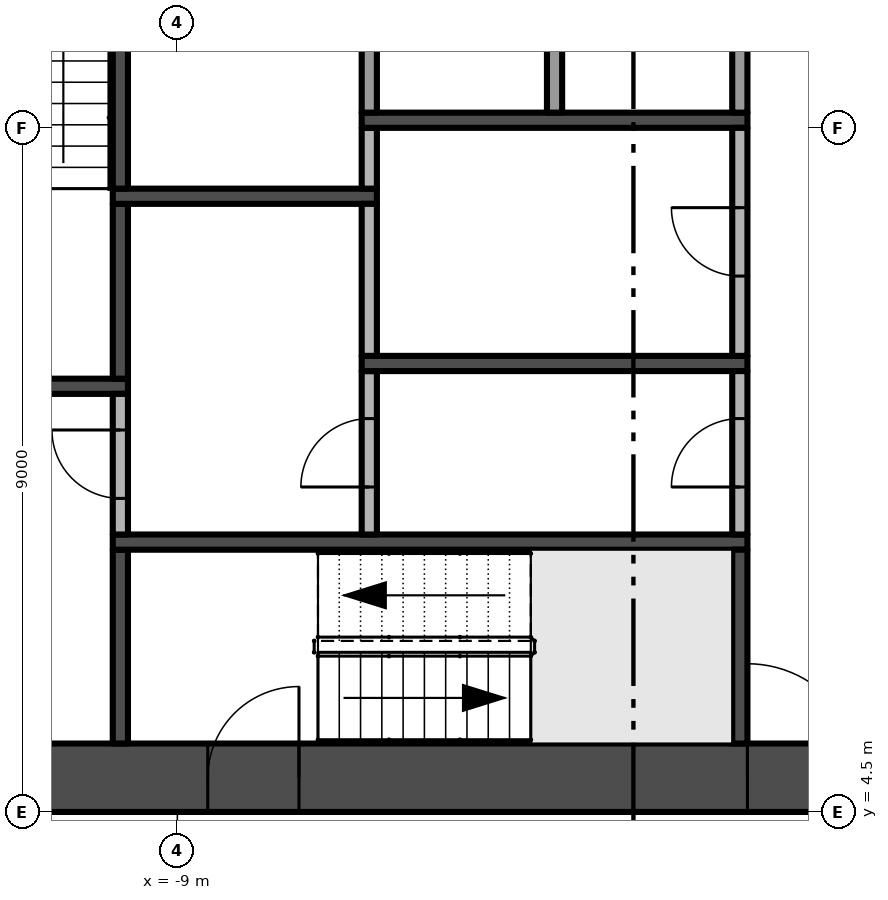
"""IFC4 building model, lengths in metres.
Left out: names, types, materials, properties, quantities, classifications, styles, units other than length and angle.
Written with IfcOpenShell. Run it as: python <this file> out.ifc"""

import sys

from ifc_helpers import new_model, si_unit, direction, frame, frame_2d, origin, place, context, subcontext, project, spatial, rectangle, extrude, element, fill, save


model = new_model("IFC4")
c1 = context("Model", 3, precision=1e-05, world=origin(), true_north=direction((0.0, 1.0)))
c2 = subcontext(c1, "Body", "Model", "MODEL_VIEW")
j1 = project(units=[si_unit("LENGTHUNIT", "METRE"), si_unit("PLANEANGLEUNIT", "RADIAN")], contexts=[c1])
p1 = place(None, origin())
s1 = spatial("IfcSite", under=j1, at=p1, CompositionType="ELEMENT")
p2 = place(p1, origin())
s2 = spatial("IfcBuilding", under=s1, at=p2, CompositionType="ELEMENT")
p3 = place(p2, frame((0.0, 0.0, 22.6)))
s3 = spatial("IfcBuildingStorey", under=s2, at=p3, CompositionType="ELEMENT", Elevation=22.6)
p4 = place(p3, frame((-13.5, 4.95, -0.3), z_axis=(0.0, 0.0, 1.0), x_axis=(1.0, 0.0, 0.0)))
e1 = element("IfcWall", 1, at=p4, inside=s3, PredefinedType="SHEAR", context=c2, shape_type="SweptSolid", body=[
    extrude(rectangle(XDim=27.0, YDim=0.9, at=frame_2d((13.5, 0.0))), origin(), (0.0, 0.0, 1.0), 3.8),
])
p5 = place(p4, frame((12.0, 0.0, 0.3)))
e2 = element("IfcOpeningElement", 2, at=p5, cuts=e1, PredefinedType="OPENING", context=c2, shape_type="SweptSolid", body=[
    extrude(rectangle(XDim=3.0, YDim=2.4, at=frame_2d((1.5, 1.2))), frame((0.0, 0.46, 0.0), z_axis=(0.0, -1.0, 0.0), x_axis=(1.0, 0.0, 0.0)), (0.0, 0.0, 1.0), 0.92),
])
p6 = place(p4, frame((4.9, 0.0, 0.3)))
e3 = element("IfcOpeningElement", 3, at=p6, cuts=e1, PredefinedType="OPENING", context=c2, shape_type="SweptSolid", body=[
    extrude(rectangle(XDim=1.2, YDim=2.2, at=frame_2d((0.6, 1.1))), frame((0.0, 0.46, 0.0), z_axis=(0.0, -1.0, 0.0), x_axis=(1.0, 0.0, 0.0)), (0.0, 0.0, 1.0), 0.92),
])
p7 = place(p4, frame((20.75, 0.0, 0.3)))
e4 = element("IfcOpeningElement", 4, at=p7, cuts=e1, PredefinedType="OPENING", context=c2, shape_type="SweptSolid", body=[
    extrude(rectangle(XDim=1.5, YDim=2.2, at=frame_2d((0.75, 1.1))), frame((0.0, 0.46, 0.0), z_axis=(0.0, -1.0, 0.0), x_axis=(1.0, 0.0, 0.0)), (0.0, 0.0, 1.0), 0.92),
])
p8 = place(p4, frame((17.4, 0.0, 0.3)))
e5 = element("IfcOpeningElement", 5, at=p8, cuts=e1, PredefinedType="OPENING", context=c2, shape_type="SweptSolid", body=[
    extrude(rectangle(XDim=1.2, YDim=2.2, at=frame_2d((0.6, 1.1))), frame((0.0, 0.46, 0.0), z_axis=(0.0, -1.0, 0.0), x_axis=(1.0, 0.0, 0.0)), (0.0, 0.0, 1.0), 0.92),
])
p9 = place(p3, frame((-12.6, 10.1, 0.0), z_axis=(0.0, 0.0, 1.0), x_axis=(1.0, 0.0, 0.0)))
e6 = element("IfcWall", 6, at=p9, inside=s3, PredefinedType="SHEAR", context=c2, shape_type="SweptSolid", body=[
    extrude(rectangle(XDim=2.95, YDim=0.2, at=frame_2d((1.475, 0.0))), origin(), (0.0, 0.0, 1.0), 3.5),
])
p10 = place(p3, frame((-9.75, 5.4, 0.0), z_axis=(0.0, 0.0, 1.0), x_axis=(0.0, 1.0, 0.0)))
e7 = element("IfcWall", 7, at=p10, inside=s3, PredefinedType="SHEAR", context=c2, shape_type="SweptSolid", body=[
    extrude(rectangle(XDim=2.55, YDim=0.2, at=frame_2d((1.275, 0.0))), origin(), (0.0, 0.0, 1.0), 3.5),
])
p11 = place(p3, frame((-9.85, 8.05, 0.0), z_axis=(0.0, 0.0, 1.0), x_axis=(1.0, 0.0, 0.0)))
e8 = element("IfcWall", 8, at=p11, inside=s3, PredefinedType="SHEAR", context=c2, shape_type="SweptSolid", body=[
    extrude(rectangle(XDim=8.35, YDim=0.2, at=frame_2d((4.175, 0.0))), origin(), (0.0, 0.0, 1.0), 3.5),
])
p12 = place(p3, frame((-9.75, 8.15, 0.0), z_axis=(0.0, 0.0, 1.0), x_axis=(0.0, 1.0, 0.0)))
e9 = element("IfcWall", 9, at=p12, inside=s3, PredefinedType="PARTITIONING", context=c2, shape_type="SweptSolid", body=[
    extrude(rectangle(XDim=1.85, YDim=0.2, at=frame_2d((0.925, 0.0))), origin(), (0.0, 0.0, 1.0), 3.5),
])
p13 = place(p12, frame((0.475, 0.0, 0.0)))
e10 = element("IfcOpeningElement", 10, at=p13, cuts=e9, PredefinedType="OPENING", context=c2, shape_type="SweptSolid", body=[
    extrude(rectangle(XDim=0.9, YDim=2.1, at=frame_2d((0.45, 1.05))), frame((0.0, 0.11, 0.0), z_axis=(0.0, -1.0, 0.0), x_axis=(1.0, 0.0, 0.0)), (0.0, 0.0, 1.0), 0.22),
])
p14 = place(p3, frame((-9.75, 10.2, 0.0), z_axis=(0.0, 0.0, 1.0), x_axis=(0.0, 1.0, 0.0)))
e11 = element("IfcWall", 11, at=p14, inside=s3, PredefinedType="SHEAR", context=c2, shape_type="SweptSolid", body=[
    extrude(rectangle(XDim=2.3, YDim=0.2, at=frame_2d((1.15, 0.0))), origin(), (0.0, 0.0, 1.0), 3.5),
])
p15 = place(p3, frame((-9.85, 12.6, 0.0), z_axis=(0.0, 0.0, 1.0), x_axis=(1.0, 0.0, 0.0)))
e12 = element("IfcWall", 12, at=p15, inside=s3, PredefinedType="SHEAR", context=c2, shape_type="SweptSolid", body=[
    extrude(rectangle(XDim=3.475, YDim=0.2, at=frame_2d((1.738, 0.0))), origin(), (0.0, 0.0, 1.0), 3.5),
])
p16 = place(p3, frame((-9.75, 12.7, 0.0), z_axis=(0.0, 0.0, 1.0), x_axis=(0.0, 1.0, 0.0)))
e13 = element("IfcWall", 13, at=p16, inside=s3, PredefinedType="SHEAR", context=c2, shape_type="SweptSolid", body=[
    extrude(rectangle(XDim=3.2, YDim=0.2, at=frame_2d((1.6, 0.0))), origin(), (0.0, 0.0, 1.0), 3.5),
])
p17 = place(p3, frame((-6.475, 8.15, 0.0), z_axis=(0.0, 0.0, 1.0), x_axis=(0.0, 1.0, 0.0)))
e14 = element("IfcWall", 14, at=p17, inside=s3, PredefinedType="PARTITIONING", context=c2, shape_type="SweptSolid", body=[
    extrude(rectangle(XDim=2.15, YDim=0.2, at=frame_2d((1.075, 0.0))), origin(), (0.0, 0.0, 1.0), 3.5),
])
p18 = place(p17, frame((0.625, 0.0, 0.0)))
e15 = element("IfcOpeningElement", 15, at=p18, cuts=e14, PredefinedType="OPENING", context=c2, shape_type="SweptSolid", body=[
    extrude(rectangle(XDim=0.9, YDim=2.1, at=frame_2d((0.45, 1.05))), frame((0.0, 0.11, 0.0), z_axis=(0.0, -1.0, 0.0), x_axis=(1.0, 0.0, 0.0)), (0.0, 0.0, 1.0), 0.22),
])
p19 = place(p3, frame((-6.575, 10.4, 0.0), z_axis=(0.0, 0.0, 1.0), x_axis=(1.0, 0.0, 0.0)))
e16 = element("IfcWall", 16, at=p19, inside=s3, PredefinedType="SHEAR", context=c2, shape_type="SweptSolid", body=[
    extrude(rectangle(XDim=5.075, YDim=0.2, at=frame_2d((2.538, 0.0))), origin(), (0.0, 0.0, 1.0), 3.5),
])
p20 = place(p3, frame((-6.475, 10.5, 0.0), z_axis=(0.0, 0.0, 1.0), x_axis=(0.0, 1.0, 0.0)))
e17 = element("IfcWall", 17, at=p20, inside=s3, PredefinedType="PARTITIONING", context=c2, shape_type="SweptSolid", body=[
    extrude(rectangle(XDim=2.0, YDim=0.2, at=frame_2d((1.0, 0.0))), origin(), (0.0, 0.0, 1.0), 3.5),
])
p21 = place(p3, frame((-6.475, 12.7, 0.0), z_axis=(0.0, 0.0, 1.0), x_axis=(0.0, 1.0, 0.0)))
e18 = element("IfcWall", 18, at=p21, inside=s3, PredefinedType="PARTITIONING", context=c2, shape_type="SweptSolid", body=[
    extrude(rectangle(XDim=0.8, YDim=0.2, at=frame_2d((0.4, 0.0))), origin(), (0.0, 0.0, 1.0), 3.5),
])
p22 = place(p3, frame((-6.575, 13.6, 0.0), z_axis=(0.0, 0.0, 1.0), x_axis=(1.0, 0.0, 0.0)))
e19 = element("IfcWall", 19, at=p22, inside=s3, PredefinedType="SHEAR", context=c2, shape_type="SweptSolid", body=[
    extrude(rectangle(XDim=5.075, YDim=0.2, at=frame_2d((2.538, 0.0))), origin(), (0.0, 0.0, 1.0), 3.5),
])
for number, where, z_axis, x_axis in (
    (20, (-6.475, 13.7, 0.0), (0.0, 0.0, 1.0), (0.0, 1.0, 0.0)),
    (21, (-4.037, 13.7, 0.0), (0.0, 0.0, 1.0), (0.0, 1.0, 0.0)),
):
    element("IfcWall", number, at=place(p3, frame(where, z_axis=z_axis, x_axis=x_axis)), inside=s3, PredefinedType="PARTITIONING", context=c2, shape_type="SweptSolid", body=[
        extrude(rectangle(XDim=2.2, YDim=0.2, at=frame_2d((1.1, 0.0))), origin(), (0.0, 0.0, 1.0), 3.5),
    ])
p23 = place(p3, frame((-1.6, 5.4, 0.0), z_axis=(0.0, 0.0, 1.0), x_axis=(0.0, 1.0, 0.0)))
e22 = element("IfcWall", 22, at=p23, inside=s3, PredefinedType="SHEAR", context=c2, shape_type="SweptSolid", body=[
    extrude(rectangle(XDim=2.55, YDim=0.2, at=frame_2d((1.275, 0.0))), origin(), (0.0, 0.0, 1.0), 3.5),
])
p24 = place(p3, frame((-1.6, 8.15, 0.0), z_axis=(0.0, 0.0, 1.0), x_axis=(0.0, 1.0, 0.0)))
e23 = element("IfcWall", 23, at=p24, inside=s3, PredefinedType="PARTITIONING", context=c2, shape_type="SweptSolid", body=[
    extrude(rectangle(XDim=2.15, YDim=0.2, at=frame_2d((1.075, 0.0))), origin(), (0.0, 0.0, 1.0), 3.5),
])
p25 = place(p24, frame((0.625, 0.0, 0.0)))
e24 = element("IfcOpeningElement", 24, at=p25, cuts=e23, PredefinedType="OPENING", context=c2, shape_type="SweptSolid", body=[
    extrude(rectangle(XDim=0.9, YDim=2.1, at=frame_2d((0.45, 1.05))), frame((0.0, 0.11, 0.0), z_axis=(0.0, -1.0, 0.0), x_axis=(1.0, 0.0, 0.0)), (0.0, 0.0, 1.0), 0.22),
])
p26 = place(p3, frame((-1.6, 10.5, 0.0), z_axis=(0.0, 0.0, 1.0), x_axis=(0.0, 1.0, 0.0)))
e25 = element("IfcWall", 25, at=p26, inside=s3, PredefinedType="PARTITIONING", context=c2, shape_type="SweptSolid", body=[
    extrude(rectangle(XDim=3.0, YDim=0.2, at=frame_2d((1.5, 0.0))), origin(), (0.0, 0.0, 1.0), 3.5),
])
p27 = place(p26, frame((1.05, 0.0, 0.0)))
e26 = element("IfcOpeningElement", 26, at=p27, cuts=e25, PredefinedType="OPENING", context=c2, shape_type="SweptSolid", body=[
    extrude(rectangle(XDim=0.9, YDim=2.1, at=frame_2d((0.45, 1.05))), frame((0.0, 0.11, 0.0), z_axis=(0.0, -1.0, 0.0), x_axis=(1.0, 0.0, 0.0)), (0.0, 0.0, 1.0), 0.22),
])
p28 = place(p3, frame((-1.6, 13.7, 0.0), z_axis=(0.0, 0.0, 1.0), x_axis=(0.0, 1.0, 0.0)))
e27 = element("IfcWall", 27, at=p28, inside=s3, PredefinedType="PARTITIONING", context=c2, shape_type="SweptSolid", body=[
    extrude(rectangle(XDim=2.2, YDim=0.2, at=frame_2d((1.1, 0.0))), origin(), (0.0, 0.0, 1.0), 3.5),
])
p29 = place(p5, frame((3.0, 0.0, 0.0), z_axis=(0.0, 0.0, 1.0), x_axis=(-1.0, 0.0, 0.0)))
e28 = element("IfcDoor", 28, at=p29, inside=s3, OperationType="DOUBLE_DOOR_SINGLE_SWING", PredefinedType="DOOR", context=c2, shape_type="SweptSolid", body=[
    extrude(rectangle(XDim=3.0, YDim=2.4, at=frame_2d((1.5, 1.2))), frame((0.0, 0.025, 0.0), z_axis=(0.0, -1.0, 0.0), x_axis=(1.0, 0.0, 0.0)), (0.0, 0.0, 1.0), 0.05),
])
fill(e2, e28)
p30 = place(p6, frame((1.2, 0.0, 0.0), z_axis=(0.0, 0.0, 1.0), x_axis=(-1.0, 0.0, 0.0)))
e29 = element("IfcDoor", 29, at=p30, inside=s3, OperationType="SINGLE_SWING_LEFT", PredefinedType="DOOR", context=c2, shape_type="SweptSolid", body=[
    extrude(rectangle(XDim=1.2, YDim=2.2, at=frame_2d((0.6, 1.1))), frame((0.0, 0.025, 0.0), z_axis=(0.0, -1.0, 0.0), x_axis=(1.0, 0.0, 0.0)), (0.0, 0.0, 1.0), 0.05),
])
fill(e3, e29)
p31 = place(p25, origin())
e30 = element("IfcDoor", 30, at=p31, inside=s3, OperationType="SINGLE_SWING_LEFT", PredefinedType="DOOR", context=c2, shape_type="SweptSolid", body=[
    extrude(rectangle(XDim=0.9, YDim=2.1, at=frame_2d((0.45, 1.05))), frame((0.0, 0.025, 0.0), z_axis=(0.0, -1.0, 0.0), x_axis=(1.0, 0.0, 0.0)), (0.0, 0.0, 1.0), 0.05),
])
fill(e24, e30)
p32 = place(p27, origin())
e31 = element("IfcDoor", 31, at=p32, inside=s3, OperationType="SINGLE_SWING_RIGHT", PredefinedType="DOOR", context=c2, shape_type="SweptSolid", body=[
    extrude(rectangle(XDim=0.9, YDim=2.1, at=frame_2d((0.45, 1.05))), frame((0.0, 0.025, 0.0), z_axis=(0.0, -1.0, 0.0), x_axis=(1.0, 0.0, 0.0)), (0.0, 0.0, 1.0), 0.05),
])
fill(e26, e31)
p33 = place(p18, origin())
e32 = element("IfcDoor", 32, at=p33, inside=s3, OperationType="SINGLE_SWING_LEFT", PredefinedType="DOOR", context=c2, shape_type="SweptSolid", body=[
    extrude(rectangle(XDim=0.9, YDim=2.1, at=frame_2d((0.45, 1.05))), frame((0.0, 0.025, 0.0), z_axis=(0.0, -1.0, 0.0), x_axis=(1.0, 0.0, 0.0)), (0.0, 0.0, 1.0), 0.05),
])
fill(e15, e32)
p34 = place(p13, origin())
e33 = element("IfcDoor", 33, at=p34, inside=s3, OperationType="SINGLE_SWING_RIGHT", PredefinedType="DOOR", context=c2, shape_type="SweptSolid", body=[
    extrude(rectangle(XDim=0.9, YDim=2.1, at=frame_2d((0.45, 1.05))), frame((0.0, 0.025, 0.0), z_axis=(0.0, -1.0, 0.0), x_axis=(1.0, 0.0, 0.0)), (0.0, 0.0, 1.0), 0.05),
])
fill(e10, e33)
save(model, sys.argv[1])
